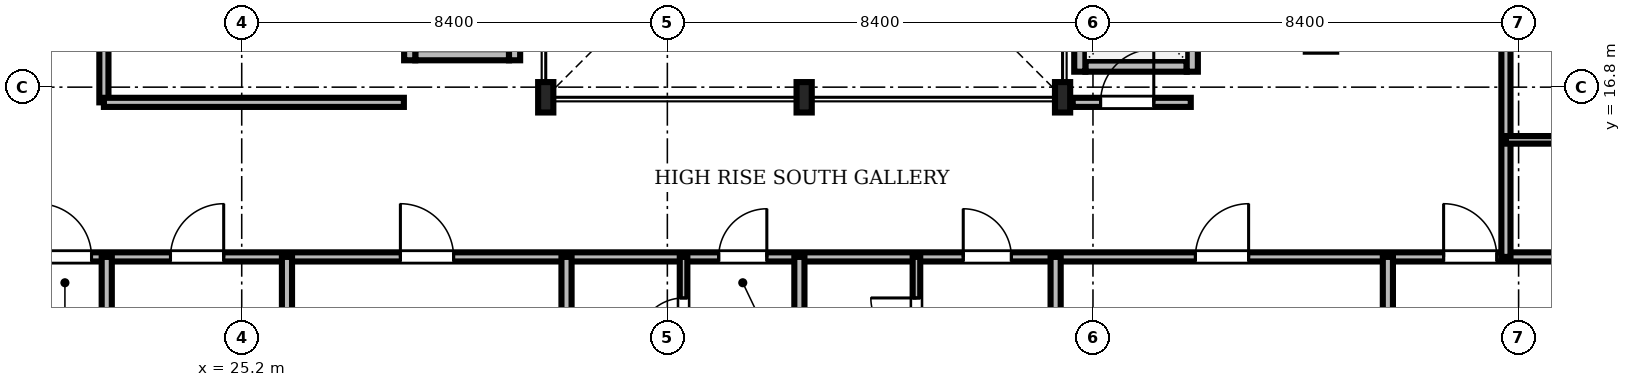
"""IFC4 building model, lengths in metres.
Left out: names, types, materials, properties, quantities, classifications, styles, units other than length and angle.
Written with IfcOpenShell. Run it as: python <this file> out.ifc"""

import sys

from ifc_helpers import new_model, si_unit, direction, frame, frame_2d, origin, origin_2d, place, context, subcontext, project, spatial, rectangle, i_section, extrude, source, transform, mapped, element, fill, save


model = new_model("IFC4")
c1 = context("Model", 3, precision=1e-05, world=origin(), true_north=direction((0.0, 1.0)))
c2 = subcontext(c1, "Body", "Model", "MODEL_VIEW")
j1 = project(units=[si_unit("LENGTHUNIT", "METRE"), si_unit("PLANEANGLEUNIT", "RADIAN")], contexts=[c1])
p1 = place(None, origin())
s1 = spatial("IfcSite", under=j1, at=p1, CompositionType="ELEMENT")
p2 = place(p1, origin())
s2 = spatial("IfcBuilding", under=s1, at=p2, CompositionType="ELEMENT")
p3 = place(p2, frame((0.0, 0.0, 242.7)))
s3 = spatial("IfcBuildingStorey", under=s2, at=p3, CompositionType="ELEMENT", Elevation=242.7)
m1 = source(origin(), c2, "Body", "SweptSolid", [
    extrude(i_section(OverallWidth=0.3, OverallDepth=0.6, WebThickness=0.015, FlangeThickness=0.03, FilletRadius=0.027, at=origin_2d()), origin(), (0.0, 0.0, 1.0), 3.73),
])
for number, where, z_axis, x_axis in (
    (1, (31.2, 16.6, 0.0), (0.0, 0.0, 1.0), (1.0, 0.0, 0.0)),
    (2, (36.3, 16.6, 0.0), (0.0, 0.0, 1.0), (1.0, 0.0, 0.0)),
    (3, (41.4, 16.6, 0.0), (0.0, 0.0, 1.0), (1.0, 0.0, 0.0)),
):
    element("IfcColumn", number, at=place(p3, frame(where, z_axis=z_axis, x_axis=x_axis)), inside=s3, PredefinedType="COLUMN", context=c2, shape_type="MappedRepresentation", body=[
        mapped(m1, transform((0.0, 0.0, 0.0), scale=1.0)),
    ])
m2 = source(origin(), c2, "Body", "SweptSolid", [
    extrude(rectangle(XDim=2.0, YDim=0.22, at=frame_2d((1.0, 0.0))), origin(), (0.0, 0.0, 1.0), 3.73),
])
p4 = place(p3, frame((41.85, 17.215, 0.0), z_axis=(0.0, 0.0, 1.0), x_axis=(1.0, 0.0, 0.0)))
e4 = element("IfcWall", 4, at=p4, inside=s3, PredefinedType="SOLIDWALL", context=c2, shape_type="MappedRepresentation", body=[
    mapped(m2, transform((0.0, 0.0, 0.0), scale=1.0)),
])
m3 = source(origin(), c2, "Body", "SweptSolid", [
    extrude(rectangle(XDim=2.19, YDim=0.22, at=frame_2d((1.095, 0.0))), origin(), (0.0, 0.0, 1.0), 3.73),
])
p5 = place(p3, frame((41.74, 17.105, 0.0), z_axis=(0.0, 0.0, 1.0), x_axis=(0.0, 1.0, 0.0)))
e5 = element("IfcWall", 5, at=p5, inside=s3, PredefinedType="SOLIDWALL", context=c2, shape_type="MappedRepresentation", body=[
    mapped(m3, transform((0.0, 0.0, 0.0), scale=1.0)),
])
p6 = place(p3, frame((43.96, 17.105, 0.0), z_axis=(0.0, 0.0, 1.0), x_axis=(0.0, 1.0, 0.0)))
e6 = element("IfcWall", 6, at=p6, inside=s3, PredefinedType="SOLIDWALL", context=c2, shape_type="MappedRepresentation", body=[
    mapped(m3, transform((0.0, 0.0, 0.0), scale=1.0)),
])
m4 = source(origin(), c2, "Body", "SweptSolid", [
    extrude(rectangle(XDim=1.1, YDim=2.2, at=frame_2d((0.55, 1.1))), frame((0.0, 0.12, 0.0), z_axis=(0.0, -1.0, 0.0), x_axis=(1.0, 0.0, 0.0)), (0.0, 0.0, 1.0), 0.24),
])
p7 = place(p6, frame((0.545, 0.0, 0.0)))
e7 = element("IfcOpeningElement", 7, at=p7, cuts=e6, PredefinedType="OPENING", context=c2, shape_type="MappedRepresentation", body=[
    mapped(m4, transform((0.0, 0.0, 0.0), scale=1.0)),
])
m5 = source(origin(), c2, "Body", "SweptSolid", [
    extrude(rectangle(XDim=1.85, YDim=0.22, at=frame_2d((0.925, 0.0))), origin(), (0.0, 0.0, 1.0), 3.73),
])
p8 = place(p3, frame((28.625, 17.44, 0.0), z_axis=(0.0, 0.0, 1.0), x_axis=(1.0, 0.0, 0.0)))
e8 = element("IfcWall", 8, at=p8, inside=s3, PredefinedType="SOLIDWALL", context=c2, shape_type="MappedRepresentation", body=[
    mapped(m5, transform((0.0, 0.0, 0.0), scale=1.0)),
])
m6 = source(origin(), c2, "Body", "SweptSolid", [
    extrude(rectangle(XDim=2.54, YDim=0.22, at=frame_2d((1.27, 0.0))), origin(), (0.0, 0.0, 1.0), 3.73),
])
for number, where, z_axis, x_axis in (
    (9, (28.515, 17.33, 0.0), (0.0, 0.0, 1.0), (0.0, 1.0, 0.0)),
    (10, (30.585, 17.33, 0.0), (0.0, 0.0, 1.0), (0.0, 1.0, 0.0)),
):
    element("IfcWall", number, at=place(p3, frame(where, z_axis=z_axis, x_axis=x_axis)), inside=s3, PredefinedType="SOLIDWALL", context=c2, shape_type="MappedRepresentation", body=[
        mapped(m6, transform((0.0, 0.0, 0.0), scale=1.0)),
    ])
m7 = source(origin(), c2, "Body", "SweptSolid", [
    extrude(rectangle(XDim=46.156, YDim=0.18, at=frame_2d((23.078, 0.0))), origin(), (0.0, 0.0, 1.0), 2.972),
])
p9 = place(p3, frame((15.922, 13.45, 0.0), z_axis=(0.0, 0.0, 1.0), x_axis=(1.0, 0.0, 0.0)))
e11 = element("IfcWall", 11, at=p9, inside=s3, PredefinedType="PARTITIONING", context=c2, shape_type="MappedRepresentation", body=[
    mapped(m7, transform((0.0, 0.0, 0.0), scale=1.0)),
])
m8 = source(origin(), c2, "Body", "SweptSolid", [
    extrude(rectangle(XDim=1.05, YDim=2.2, at=frame_2d((0.525, 1.1))), frame((0.0, 0.1, 0.0), z_axis=(0.0, -1.0, 0.0), x_axis=(1.0, 0.0, 0.0)), (0.0, 0.0, 1.0), 0.2),
])
p10 = place(p9, frame((5.264, 0.0, 0.0)))
e12 = element("IfcOpeningElement", 12, at=p10, cuts=e11, PredefinedType="OPENING", context=c2, shape_type="MappedRepresentation", body=[
    mapped(m8, transform((0.0, 0.0, 0.0), scale=1.0)),
])
p11 = place(p9, frame((7.872, 0.0, 0.0)))
e13 = element("IfcOpeningElement", 13, at=p11, cuts=e11, PredefinedType="OPENING", context=c2, shape_type="MappedRepresentation", body=[
    mapped(m8, transform((0.0, 0.0, 0.0), scale=1.0)),
])
p12 = place(p9, frame((12.409, 0.0, 0.0)))
e14 = element("IfcOpeningElement", 14, at=p12, cuts=e11, PredefinedType="OPENING", context=c2, shape_type="MappedRepresentation", body=[
    mapped(m8, transform((0.0, 0.0, 0.0), scale=1.0)),
])
m9 = source(origin(), c2, "Body", "SweptSolid", [
    extrude(rectangle(XDim=0.95, YDim=2.15, at=frame_2d((0.475, 1.075))), frame((0.0, 0.1, 0.0), z_axis=(0.0, -1.0, 0.0), x_axis=(1.0, 0.0, 0.0)), (0.0, 0.0, 1.0), 0.2),
])
p13 = place(p9, frame((18.691, 0.0, 0.0)))
e15 = element("IfcOpeningElement", 15, at=p13, cuts=e11, PredefinedType="OPENING", context=c2, shape_type="MappedRepresentation", body=[
    mapped(m9, transform((0.0, 0.0, 0.0), scale=1.0)),
])
p14 = place(p9, frame((23.518, 0.0, 0.0)))
e16 = element("IfcOpeningElement", 16, at=p14, cuts=e11, PredefinedType="OPENING", context=c2, shape_type="MappedRepresentation", body=[
    mapped(m9, transform((0.0, 0.0, 0.0), scale=1.0)),
])
p15 = place(p9, frame((28.1, 0.0, 0.0)))
e17 = element("IfcOpeningElement", 17, at=p15, cuts=e11, PredefinedType="OPENING", context=c2, shape_type="MappedRepresentation", body=[
    mapped(m8, transform((0.0, 0.0, 0.0), scale=1.0)),
])
p16 = place(p9, frame((32.998, 0.0, 0.0)))
e18 = element("IfcOpeningElement", 18, at=p16, cuts=e11, PredefinedType="OPENING", context=c2, shape_type="MappedRepresentation", body=[
    mapped(m8, transform((0.0, 0.0, 0.0), scale=1.0)),
])
m10 = source(origin(), c2, "Body", "SweptSolid", [
    extrude(rectangle(XDim=27.65, YDim=0.18, at=frame_2d((13.825, 0.0))), origin(), (0.0, 0.0, 1.0), 3.172),
])
p17 = place(p3, frame((50.15, 13.45, 0.0), z_axis=(0.0, 0.0, 1.0), x_axis=(0.0, 1.0, 0.0)))
e19 = element("IfcWall", 19, at=p17, inside=s3, PredefinedType="PARTITIONING", context=c2, shape_type="MappedRepresentation", body=[
    mapped(m10, transform((0.0, 0.0, 0.0), scale=1.0)),
])
p18 = place(p17, frame((5.237, 0.0, 0.0)))
e20 = element("IfcOpeningElement", 20, at=p18, cuts=e19, PredefinedType="OPENING", context=c2, shape_type="MappedRepresentation", body=[
    mapped(m8, transform((0.0, 0.0, 0.0), scale=1.0)),
])
p19 = place(p17, frame((14.38, 0.0, 0.0)))
e21 = element("IfcOpeningElement", 21, at=p19, cuts=e19, PredefinedType="OPENING", context=c2, shape_type="MappedRepresentation", body=[
    mapped(m8, transform((0.0, 0.0, 0.0), scale=1.0)),
])
p20 = place(p17, frame((23.523, 0.0, 0.0)))
e22 = element("IfcOpeningElement", 22, at=p20, cuts=e19, PredefinedType="OPENING", context=c2, shape_type="MappedRepresentation", body=[
    mapped(m8, transform((0.0, 0.0, 0.0), scale=1.0)),
])
m11 = source(origin(), c2, "Body", "SweptSolid", [
    extrude(rectangle(XDim=3.55, YDim=0.18, at=frame_2d((1.775, 0.0))), origin(), (0.0, 0.0, 1.0), 3.73),
])
p21 = place(p3, frame((22.48, 16.5, 0.0), z_axis=(0.0, 0.0, 1.0), x_axis=(0.0, 1.0, 0.0)))
e23 = element("IfcWall", 23, at=p21, inside=s3, PredefinedType="PARTITIONING", context=c2, shape_type="MappedRepresentation", body=[
    mapped(m11, transform((0.0, 0.0, 0.0), scale=1.0)),
])
p22 = place(p21, frame((1.15, 0.0, 0.0)))
e24 = element("IfcOpeningElement", 24, at=p22, cuts=e23, PredefinedType="OPENING", context=c2, shape_type="MappedRepresentation", body=[
    mapped(m8, transform((0.0, 0.0, 0.0), scale=1.0)),
])
m12 = source(origin(), c2, "Body", "SweptSolid", [
    extrude(rectangle(XDim=2.36, YDim=0.15, at=frame_2d((1.18, 0.0))), origin(), (0.0, 0.0, 1.0), 3.422),
])
p23 = place(p3, frame((33.92, 11.09, 0.0), z_axis=(0.0, 0.0, 1.0), x_axis=(0.0, 1.0, 0.0)))
e25 = element("IfcWall", 25, at=p23, inside=s3, PredefinedType="PARTITIONING", context=c2, shape_type="MappedRepresentation", body=[
    mapped(m12, transform((0.0, 0.0, 0.0), scale=1.0)),
])
m13 = source(origin(), c2, "Body", "SweptSolid", [
    extrude(rectangle(XDim=0.9, YDim=2.1, at=frame_2d((0.45, 1.05))), frame((0.0, 0.085, 0.0), z_axis=(0.0, -1.0, 0.0), x_axis=(1.0, 0.0, 0.0)), (0.0, 0.0, 1.0), 0.17),
])
p24 = place(p23, frame((0.65, 0.0, 0.0)))
e26 = element("IfcOpeningElement", 26, at=p24, cuts=e25, PredefinedType="OPENING", context=c2, shape_type="MappedRepresentation", body=[
    mapped(m13, transform((0.0, 0.0, 0.0), scale=1.0)),
])
m14 = source(origin(), c2, "Body", "SweptSolid", [
    extrude(rectangle(XDim=2.36, YDim=0.15, at=frame_2d((1.18, 0.0))), origin(), (0.0, 0.0, 1.0), 3.172),
])
p25 = place(p3, frame((38.516, 11.09, 0.0), z_axis=(0.0, 0.0, 1.0), x_axis=(0.0, 1.0, 0.0)))
e27 = element("IfcWall", 27, at=p25, inside=s3, PredefinedType="PARTITIONING", context=c2, shape_type="MappedRepresentation", body=[
    mapped(m14, transform((0.0, 0.0, 0.0), scale=1.0)),
])
p26 = place(p25, frame((0.65, 0.0, 0.0)))
e28 = element("IfcOpeningElement", 28, at=p26, cuts=e27, PredefinedType="OPENING", context=c2, shape_type="MappedRepresentation", body=[
    mapped(m13, transform((0.0, 0.0, 0.0), scale=1.0)),
])
m15 = source(origin(), c2, "Body", "SweptSolid", [
    extrude(rectangle(XDim=2.33, YDim=0.18, at=frame_2d((1.165, 0.0))), origin(), (0.0, 0.0, 1.0), 3.172),
])
p27 = place(p3, frame((41.6, 16.5, 0.0), z_axis=(0.0, 0.0, 1.0), x_axis=(1.0, 0.0, 0.0)))
e29 = element("IfcWall", 29, at=p27, inside=s3, PredefinedType="PARTITIONING", context=c2, shape_type="MappedRepresentation", body=[
    mapped(m15, transform((0.0, 0.0, 0.0), scale=1.0)),
])
p28 = place(p27, frame((0.55, 0.0, 0.0)))
e30 = element("IfcOpeningElement", 30, at=p28, cuts=e29, PredefinedType="OPENING", context=c2, shape_type="MappedRepresentation", body=[
    mapped(m8, transform((0.0, 0.0, 0.0), scale=1.0)),
])
m16 = source(origin(), c2, "Body", "SweptSolid", [
    extrude(rectangle(XDim=11.328, YDim=0.2, at=frame_2d((5.664, 0.0))), origin(), (0.0, 0.0, 1.0), 2.972),
])
for number, where, z_axis, x_axis in (
    (31, (22.536, 2.122, 0.0), (0.0, 0.0, 1.0), (0.0, 1.0, 0.0)),
    (32, (26.093, 2.122, 0.0), (0.0, 0.0, 1.0), (0.0, 1.0, 0.0)),
    (33, (31.61, 2.122, 0.0), (0.0, 0.0, 1.0), (0.0, 1.0, 0.0)),
):
    element("IfcWall", number, at=place(p3, frame(where, z_axis=z_axis, x_axis=x_axis)), inside=s3, PredefinedType="PARTITIONING", context=c2, shape_type="MappedRepresentation", body=[
        mapped(m16, transform((0.0, 0.0, 0.0), scale=1.0)),
    ])
m17 = source(origin(), c2, "Body", "SweptSolid", [
    extrude(rectangle(XDim=11.52, YDim=0.2, at=frame_2d((5.76, 0.0))), origin(), (0.0, 0.0, 1.0), 2.972),
])
for number, where, z_axis, x_axis in (
    (34, (36.206, 1.93, 0.0), (0.0, 0.0, 1.0), (0.0, 1.0, 0.0)),
    (35, (41.263, 1.93, 0.0), (0.0, 0.0, 1.0), (0.0, 1.0, 0.0)),
):
    element("IfcWall", number, at=place(p3, frame(where, z_axis=z_axis, x_axis=x_axis)), inside=s3, PredefinedType="PARTITIONING", context=c2, shape_type="MappedRepresentation", body=[
        mapped(m17, transform((0.0, 0.0, 0.0), scale=1.0)),
    ])
p29 = place(p3, frame((47.82, 2.122, 0.0), z_axis=(0.0, 0.0, 1.0), x_axis=(0.0, 1.0, 0.0)))
e36 = element("IfcWall", 36, at=p29, inside=s3, PredefinedType="PARTITIONING", context=c2, shape_type="MappedRepresentation", body=[
    mapped(m16, transform((0.0, 0.0, 0.0), scale=1.0)),
])
m18 = source(origin(), c2, "Body", "SweptSolid", [
    extrude(rectangle(XDim=5.92, YDim=0.18, at=frame_2d((2.96, 0.0))), origin(), (0.0, 0.0, 1.0), 3.73),
])
p30 = place(p3, frame((22.48, 16.5, 0.0), z_axis=(0.0, 0.0, 1.0), x_axis=(1.0, 0.0, 0.0)))
e37 = element("IfcWall", 37, at=p30, inside=s3, PredefinedType="PARTITIONING", context=c2, shape_type="MappedRepresentation", body=[
    mapped(m18, transform((0.0, 0.0, 0.0), scale=1.0)),
])
m19 = source(origin(), c2, "Body", "SweptSolid", [
    extrude(rectangle(XDim=2.36, YDim=0.15, at=frame_2d((1.18, 0.0))), origin(), (0.0, 0.0, 1.0), 3.73),
])
p31 = place(p3, frame((50.15, 15.76, 0.0), z_axis=(0.0, 0.0, 1.0), x_axis=(1.0, 0.0, 0.0)))
e38 = element("IfcWall", 38, at=p31, inside=s3, PredefinedType="PARTITIONING", context=c2, shape_type="MappedRepresentation", body=[
    mapped(m19, transform((0.0, 0.0, 0.0), scale=1.0)),
])
m20 = source(origin(), c2, "Body", "SweptSolid", [
    extrude(rectangle(XDim=1.05, YDim=2.2, at=frame_2d((0.525, 1.1))), frame((0.0, 0.025, 0.0), z_axis=(0.0, -1.0, 0.0), x_axis=(1.0, 0.0, 0.0)), (0.0, 0.0, 1.0), 0.05),
])
p32 = place(p10, origin())
e39 = element("IfcDoor", 39, at=p32, inside=s3, OperationType="SINGLE_SWING_LEFT", PredefinedType="DOOR", context=c2, shape_type="MappedRepresentation", body=[
    mapped(m20, transform((0.0, 0.0, 0.0), scale=1.0)),
])
fill(e12, e39)
p33 = place(p11, origin())
e40 = element("IfcDoor", 40, at=p33, inside=s3, OperationType="SINGLE_SWING_RIGHT", PredefinedType="DOOR", context=c2, shape_type="MappedRepresentation", body=[
    mapped(m20, transform((0.0, 0.0, 0.0), scale=1.0)),
])
fill(e13, e40)
p34 = place(p12, origin())
e41 = element("IfcDoor", 41, at=p34, inside=s3, OperationType="SINGLE_SWING_LEFT", PredefinedType="DOOR", context=c2, shape_type="MappedRepresentation", body=[
    mapped(m20, transform((0.0, 0.0, 0.0), scale=1.0)),
])
fill(e14, e41)
m21 = source(origin(), c2, "Body", "SweptSolid", [
    extrude(rectangle(XDim=0.95, YDim=2.15, at=frame_2d((0.475, 1.075))), frame((0.0, 0.025, 0.0), z_axis=(0.0, -1.0, 0.0), x_axis=(1.0, 0.0, 0.0)), (0.0, 0.0, 1.0), 0.05),
])
p35 = place(p13, origin())
e42 = element("IfcDoor", 42, at=p35, inside=s3, OperationType="SINGLE_SWING_RIGHT", PredefinedType="DOOR", context=c2, shape_type="MappedRepresentation", body=[
    mapped(m21, transform((0.0, 0.0, 0.0), scale=1.0)),
])
fill(e15, e42)
p36 = place(p14, origin())
e43 = element("IfcDoor", 43, at=p36, inside=s3, OperationType="SINGLE_SWING_LEFT", PredefinedType="DOOR", context=c2, shape_type="MappedRepresentation", body=[
    mapped(m21, transform((0.0, 0.0, 0.0), scale=1.0)),
])
fill(e16, e43)
p37 = place(p15, origin())
e44 = element("IfcDoor", 44, at=p37, inside=s3, OperationType="SINGLE_SWING_RIGHT", PredefinedType="DOOR", context=c2, shape_type="MappedRepresentation", body=[
    mapped(m20, transform((0.0, 0.0, 0.0), scale=1.0)),
])
fill(e17, e44)
p38 = place(p16, origin())
e45 = element("IfcDoor", 45, at=p38, inside=s3, OperationType="SINGLE_SWING_LEFT", PredefinedType="DOOR", context=c2, shape_type="MappedRepresentation", body=[
    mapped(m20, transform((0.0, 0.0, 0.0), scale=1.0)),
])
fill(e18, e45)
m22 = source(origin(), c2, "Body", "SweptSolid", [
    extrude(rectangle(XDim=0.9, YDim=2.1, at=frame_2d((0.45, 1.05))), frame((0.0, 0.025, 0.0), z_axis=(0.0, -1.0, 0.0), x_axis=(1.0, 0.0, 0.0)), (0.0, 0.0, 1.0), 0.05),
])
p39 = place(p24, origin())
e46 = element("IfcDoor", 46, at=p39, inside=s3, OperationType="SINGLE_SWING_LEFT", PredefinedType="DOOR", context=c2, shape_type="MappedRepresentation", body=[
    mapped(m22, transform((0.0, 0.0, 0.0), scale=1.0)),
])
fill(e26, e46)
p40 = place(p26, origin())
e47 = element("IfcDoor", 47, at=p40, inside=s3, OperationType="SINGLE_SWING_RIGHT", PredefinedType="DOOR", context=c2, shape_type="MappedRepresentation", body=[
    mapped(m22, transform((0.0, 0.0, 0.0), scale=1.0)),
])
fill(e28, e47)
p41 = place(p28, origin())
e48 = element("IfcDoor", 48, at=p41, inside=s3, OperationType="SINGLE_SWING_RIGHT", PredefinedType="DOOR", context=c2, shape_type="MappedRepresentation", body=[
    mapped(m20, transform((0.0, 0.0, 0.0), scale=1.0)),
])
fill(e30, e48)
save(model, sys.argv[1])
